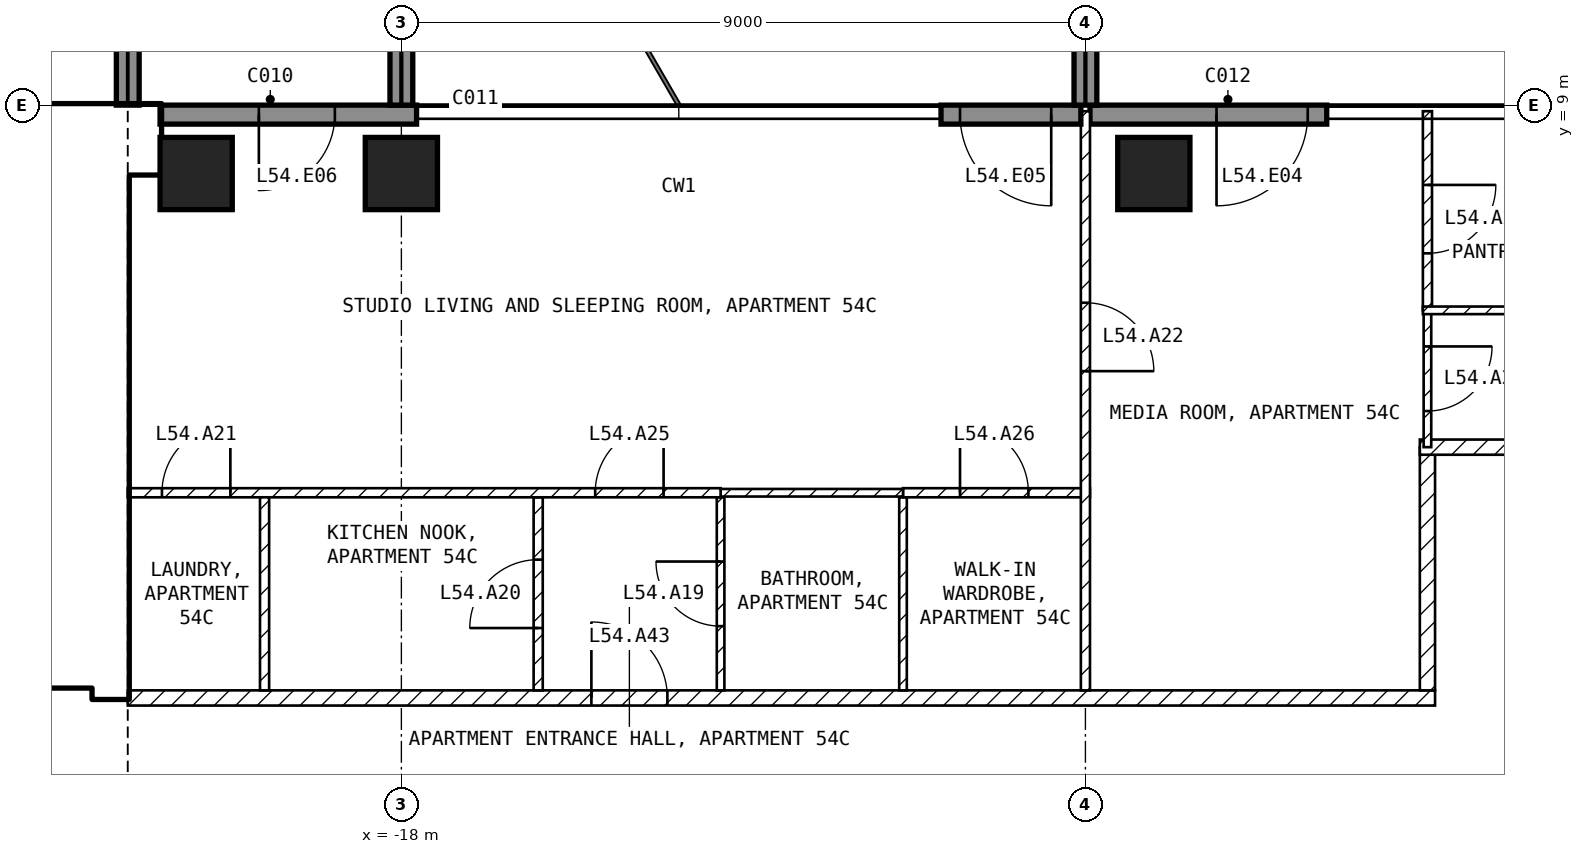
"""IFC4 building model, lengths in metres.
Left out: names, types, materials, properties, quantities, classifications, styles, units other than length and angle.
Written with IfcOpenShell. Run it as: python <this file> out.ifc"""

import sys

from ifc_helpers import new_model, si_unit, direction, frame, frame_2d, origin, origin_2d, place, context, subcontext, project, spatial, rectangle, extrude, element, fill, save


model = new_model("IFC4")
c1 = context("Model", 3, precision=1e-05, world=origin(), true_north=direction((0.0, 1.0)))
c2 = subcontext(c1, "Body", "Model", "MODEL_VIEW")
j1 = project(units=[si_unit("LENGTHUNIT", "METRE"), si_unit("PLANEANGLEUNIT", "RADIAN")], contexts=[c1])
p1 = place(None, origin())
s1 = spatial("IfcSite", under=j1, at=p1, CompositionType="ELEMENT")
p2 = place(p1, origin())
s2 = spatial("IfcBuilding", under=s1, at=p2, CompositionType="ELEMENT")
p3 = place(p2, frame((0.0, 0.0, 215.6)))
s3 = spatial("IfcBuildingStorey", under=s2, at=p3, CompositionType="ELEMENT", Elevation=215.6)
for number, where, z_axis, x_axis in (
    (1, (-20.7, 8.1, -0.25), (0.0, 0.0, 1.0), (1.0, 0.0, 0.0)),
    (2, (-18.0, 8.1, -0.25), (0.0, 0.0, 1.0), (1.0, 0.0, 0.0)),
    (3, (-8.1, 8.1, -0.25), (0.0, 0.0, 1.0), (1.0, 0.0, 0.0)),
):
    element("IfcColumn", number, at=place(p3, frame(where, z_axis=z_axis, x_axis=x_axis)), inside=s3, PredefinedType="COLUMN", context=c2, shape_type="SweptSolid", body=[
        extrude(rectangle(XDim=0.95, YDim=0.95, at=origin_2d()), origin(), (0.0, 0.0, 1.0), 3.5),
    ])
p4 = place(p3, frame((-5.825, 8.875, 0.0), z_axis=(0.0, 0.0, 1.0), x_axis=(-1.0, 0.0, 0.0)))
e4 = element("IfcWall", 4, at=p4, inside=s3, PredefinedType="SOLIDWALL", context=c2, shape_type="SweptSolid", body=[
    extrude(rectangle(XDim=3.115, YDim=0.25, at=frame_2d((1.558, 0.0))), origin(), (0.0, 0.0, 1.0), 3.25),
])
p5 = place(p4, frame((0.25, 0.0, 0.0)))
e5 = element("IfcOpeningElement", 5, at=p5, cuts=e4, PredefinedType="OPENING", context=c2, shape_type="SweptSolid", body=[
    extrude(rectangle(XDim=1.2, YDim=2.4, at=frame_2d((0.6, 1.2))), frame((0.0, 0.135, 0.0), z_axis=(0.0, -1.0, 0.0), x_axis=(1.0, 0.0, 0.0)), (0.0, 0.0, 1.0), 0.27),
])
p6 = place(p3, frame((-9.06, 8.875, 0.0), z_axis=(0.0, 0.0, 1.0), x_axis=(-1.0, 0.0, 0.0)))
e6 = element("IfcWall", 6, at=p6, inside=s3, PredefinedType="SOLIDWALL", context=c2, shape_type="SweptSolid", body=[
    extrude(rectangle(XDim=1.84, YDim=0.25, at=frame_2d((0.92, 0.0))), origin(), (0.0, 0.0, 1.0), 3.25),
])
p7 = place(p6, frame((0.39, 0.0, 0.0)))
e7 = element("IfcOpeningElement", 7, at=p7, cuts=e6, PredefinedType="OPENING", context=c2, shape_type="SweptSolid", body=[
    extrude(rectangle(XDim=1.2, YDim=2.4, at=frame_2d((0.6, 1.2))), frame((0.0, 0.135, 0.0), z_axis=(0.0, -1.0, 0.0), x_axis=(1.0, 0.0, 0.0)), (0.0, 0.0, 1.0), 0.27),
])
p8 = place(p3, frame((-17.8, 8.875, 0.0), z_axis=(0.0, 0.0, 1.0), x_axis=(-1.0, 0.0, 0.0)))
e8 = element("IfcWall", 8, at=p8, inside=s3, PredefinedType="SOLIDWALL", context=c2, shape_type="SweptSolid", body=[
    extrude(rectangle(XDim=3.375, YDim=0.25, at=frame_2d((1.688, 0.0))), origin(), (0.0, 0.0, 1.0), 3.25),
])
p9 = place(p8, frame((1.075, 0.0, 0.0)))
e9 = element("IfcOpeningElement", 9, at=p9, cuts=e8, PredefinedType="OPENING", context=c2, shape_type="SweptSolid", body=[
    extrude(rectangle(XDim=1.0, YDim=2.4, at=frame_2d((0.5, 1.2))), frame((0.0, 0.135, 0.0), z_axis=(0.0, -1.0, 0.0), x_axis=(1.0, 0.0, 0.0)), (0.0, 0.0, 1.0), 0.27),
])
for number, where, z_axis, x_axis in (
    (10, (-21.6, 9.0, 0.0), (0.0, 0.0, 1.0), (0.0, 1.0, 0.0)),
    (11, (-18.0, 9.0, 0.0), (0.0, 0.0, 1.0), (0.0, 1.0, 0.0)),
    (12, (-9.0, 9.0, 0.0), (0.0, 0.0, 1.0), (0.0, 1.0, 0.0)),
):
    element("IfcWall", number, at=place(p3, frame(where, z_axis=z_axis, x_axis=x_axis)), inside=s3, PredefinedType="SOLIDWALL", context=c2, shape_type="SweptSolid", body=[
        extrude(rectangle(XDim=2.7, YDim=0.3, at=frame_2d((1.35, 0.0))), origin(), (0.0, 0.0, 1.0), 3.25),
    ])
p10 = place(p3, frame((-29.6, 8.55, 0.0), z_axis=(0.0, 0.0, 1.0), x_axis=(1.0, 0.0, 0.0)))
e13 = element("IfcWall", 13, at=p10, inside=s3, PredefinedType="SHEAR", context=c2, shape_type="SweptSolid", body=[
    extrude(rectangle(XDim=8.425, YDim=0.9, at=frame_2d((4.212, 0.0))), origin(), (0.0, 0.0, 1.0), 3.25),
])
p11 = place(p3, frame((-21.825, 1.2, 0.0), z_axis=(0.0, 0.0, 1.0), x_axis=(0.0, 1.0, 0.0)))
e14 = element("IfcWall", 14, at=p11, inside=s3, PredefinedType="SHEAR", context=c2, shape_type="SweptSolid", body=[
    extrude(rectangle(XDim=6.9, YDim=0.45, at=frame_2d((3.45, 0.0))), origin(), (0.0, 0.0, 1.0), 3.25),
])
p12 = place(p3, frame((-33.2, 1.45, 0.0), z_axis=(0.0, 0.0, 1.0), x_axis=(1.0, 0.0, 0.0)))
e15 = element("IfcWall", 15, at=p12, inside=s3, PredefinedType="SOLIDWALL", context=c2, shape_type="SweptSolid", body=[
    extrude(rectangle(XDim=11.15, YDim=0.2, at=frame_2d((5.575, 0.0))), origin(), (0.0, 0.0, 1.0), 3.25),
])
p13 = place(p12, frame((9.4, 0.0, 0.0)))
e16 = element("IfcOpeningElement", 16, at=p13, cuts=e15, PredefinedType="OPENING", context=c2, shape_type="SweptSolid", body=[
    extrude(rectangle(XDim=1.0, YDim=2.1, at=frame_2d((0.5, 1.05))), frame((0.0, 0.11, 0.0), z_axis=(0.0, -1.0, 0.0), x_axis=(1.0, 0.0, 0.0)), (0.0, 0.0, 1.0), 0.22),
])
p14 = place(p12, frame((6.9, 0.0, 0.0)))
e17 = element("IfcOpeningElement", 17, at=p14, cuts=e15, PredefinedType="OPENING", context=c2, shape_type="SweptSolid", body=[
    extrude(rectangle(XDim=1.0, YDim=2.1, at=frame_2d((0.5, 1.05))), frame((0.0, 0.11, 0.0), z_axis=(0.0, -1.0, 0.0), x_axis=(1.0, 0.0, 0.0)), (0.0, 0.0, 1.0), 0.22),
])
p15 = place(p12, frame((1.1, 0.0, 0.0)))
e18 = element("IfcOpeningElement", 18, at=p15, cuts=e15, PredefinedType="OPENING", context=c2, shape_type="SweptSolid", body=[
    extrude(rectangle(XDim=0.9, YDim=2.1, at=frame_2d((0.45, 1.05))), frame((0.0, 0.11, 0.0), z_axis=(0.0, -1.0, 0.0), x_axis=(1.0, 0.0, 0.0)), (0.0, 0.0, 1.0), 0.22),
])
p16 = place(p3, frame((-28.35, 5.15, 0.0), z_axis=(0.0, 0.0, 1.0), x_axis=(1.0, 0.0, 0.0)))
e19 = element("IfcWall", 19, at=p16, inside=s3, PredefinedType="SOLIDWALL", context=c2, shape_type="SweptSolid", body=[
    extrude(rectangle(XDim=6.3, YDim=0.2, at=frame_2d((3.15, 0.0))), origin(), (0.0, 0.0, 1.0), 3.25),
])
p17 = place(p16, frame((5.1, 0.0, 0.0)))
e20 = element("IfcOpeningElement", 20, at=p17, cuts=e19, PredefinedType="OPENING", context=c2, shape_type="SweptSolid", body=[
    extrude(rectangle(XDim=1.0, YDim=2.1, at=frame_2d((0.5, 1.05))), frame((0.0, 0.11, 0.0), z_axis=(0.0, -1.0, 0.0), x_axis=(1.0, 0.0, 0.0)), (0.0, 0.0, 1.0), 0.22),
])
p18 = place(p3, frame((-21.6, 1.2, 0.0), z_axis=(0.0, 0.0, 1.0), x_axis=(1.0, 0.0, 0.0)))
e21 = element("IfcWall", 21, at=p18, inside=s3, PredefinedType="PARTITIONING", context=c2, shape_type="SweptSolid", body=[
    extrude(rectangle(XDim=17.2, YDim=0.2, at=frame_2d((8.6, 0.0))), origin(), (0.0, 0.0, 1.0), 3.25),
])
p19 = place(p18, frame((6.1, 0.0, 0.0)))
e22 = element("IfcOpeningElement", 22, at=p19, cuts=e21, PredefinedType="OPENING", context=c2, shape_type="SweptSolid", body=[
    extrude(rectangle(XDim=1.0, YDim=2.1, at=frame_2d((0.5, 1.05))), frame((0.0, 0.11, 0.0), z_axis=(0.0, -1.0, 0.0), x_axis=(1.0, 0.0, 0.0)), (0.0, 0.0, 1.0), 0.22),
])
p20 = place(p3, frame((-4.5, 1.3, 0.0), z_axis=(0.0, 0.0, 1.0), x_axis=(0.0, 1.0, 0.0)))
e23 = element("IfcWall", 23, at=p20, inside=s3, PredefinedType="PARTITIONING", context=c2, shape_type="SweptSolid", body=[
    extrude(rectangle(XDim=3.2, YDim=0.2, at=frame_2d((1.6, 0.0))), origin(), (0.0, 0.0, 1.0), 3.25),
])
p21 = place(p3, frame((-4.6, 4.5, 0.0), z_axis=(0.0, 0.0, 1.0), x_axis=(1.0, 0.0, 0.0)))
e24 = element("IfcWall", 24, at=p21, inside=s3, PredefinedType="PARTITIONING", context=c2, shape_type="SweptSolid", body=[
    extrude(rectangle(XDim=3.5, YDim=0.2, at=frame_2d((1.75, 0.0))), origin(), (0.0, 0.0, 1.0), 3.25),
])
p22 = place(p3, frame((-11.4, 1.3, 0.0), z_axis=(0.0, 0.0, 1.0), x_axis=(0.0, 1.0, 0.0)))
e25 = element("IfcWall", 25, at=p22, inside=s3, PredefinedType="PARTITIONING", context=c2, shape_type="SweptSolid", body=[
    extrude(rectangle(XDim=2.54, YDim=0.1, at=frame_2d((1.27, 0.0))), origin(), (0.0, 0.0, 1.0), 3.25),
])
p23 = place(p3, frame((-11.4, 3.9, 0.0), z_axis=(0.0, 0.0, 1.0), x_axis=(1.0, 0.0, 0.0)))
e26 = element("IfcWall", 26, at=p23, inside=s3, PredefinedType="PARTITIONING", context=c2, shape_type="SweptSolid", body=[
    extrude(rectangle(XDim=2.46, YDim=0.12, at=frame_2d((1.23, 0.0))), origin(), (0.0, 0.0, 1.0), 3.25),
])
p24 = place(p23, frame((0.75, 0.0, 0.0)))
e27 = element("IfcOpeningElement", 27, at=p24, cuts=e26, PredefinedType="OPENING", context=c2, shape_type="SweptSolid", body=[
    extrude(rectangle(XDim=0.9, YDim=2.1, at=frame_2d((0.45, 1.05))), frame((0.0, 0.07, 0.0), z_axis=(0.0, -1.0, 0.0), x_axis=(1.0, 0.0, 0.0)), (0.0, 0.0, 1.0), 0.14),
])
p25 = place(p3, frame((-9.0, 8.92, 0.0), z_axis=(0.0, 0.0, 1.0), x_axis=(0.0, -1.0, 0.0)))
e28 = element("IfcWall", 28, at=p25, inside=s3, PredefinedType="PARTITIONING", context=c2, shape_type="SweptSolid", body=[
    extrude(rectangle(XDim=7.62, YDim=0.12, at=frame_2d((3.81, 0.0))), origin(), (0.0, 0.0, 1.0), 3.25),
])
p26 = place(p25, frame((2.52, 0.0, 0.0)))
e29 = element("IfcOpeningElement", 29, at=p26, cuts=e28, PredefinedType="OPENING", context=c2, shape_type="SweptSolid", body=[
    extrude(rectangle(XDim=0.9, YDim=2.1, at=frame_2d((0.45, 1.05))), frame((0.0, 0.07, 0.0), z_axis=(0.0, -1.0, 0.0), x_axis=(1.0, 0.0, 0.0)), (0.0, 0.0, 1.0), 0.14),
])
p27 = place(p3, frame((-13.8, 1.3, 0.0), z_axis=(0.0, 0.0, 1.0), x_axis=(0.0, 1.0, 0.0)))
e30 = element("IfcWall", 30, at=p27, inside=s3, PredefinedType="PARTITIONING", context=c2, shape_type="SweptSolid", body=[
    extrude(rectangle(XDim=2.54, YDim=0.1, at=frame_2d((1.27, 0.0))), origin(), (0.0, 0.0, 1.0), 3.25),
])
p28 = place(p27, frame((0.845, 0.0, 0.0)))
e31 = element("IfcOpeningElement", 31, at=p28, cuts=e30, PredefinedType="OPENING", context=c2, shape_type="SweptSolid", body=[
    extrude(rectangle(XDim=0.85, YDim=2.1, at=frame_2d((0.425, 1.05))), frame((0.0, 0.06, 0.0), z_axis=(0.0, -1.0, 0.0), x_axis=(1.0, 0.0, 0.0)), (0.0, 0.0, 1.0), 0.12),
])
p29 = place(p3, frame((-13.8, 3.9, 0.0), z_axis=(0.0, 0.0, 1.0), x_axis=(1.0, 0.0, 0.0)))
e32 = element("IfcWall", 32, at=p29, inside=s3, PredefinedType="PARTITIONING", context=c2, shape_type="SweptSolid", body=[
    extrude(rectangle(XDim=2.4, YDim=0.1, at=frame_2d((1.2, 0.0))), origin(), (0.0, 0.0, 1.0), 3.25),
])
p30 = place(p3, frame((-16.2, 1.3, 0.0), z_axis=(0.0, 0.0, 1.0), x_axis=(0.0, 1.0, 0.0)))
e33 = element("IfcWall", 33, at=p30, inside=s3, PredefinedType="PARTITIONING", context=c2, shape_type="SweptSolid", body=[
    extrude(rectangle(XDim=2.54, YDim=0.12, at=frame_2d((1.27, 0.0))), origin(), (0.0, 0.0, 1.0), 3.25),
])
p31 = place(p30, frame((0.82, 0.0, 0.0)))
e34 = element("IfcOpeningElement", 34, at=p31, cuts=e33, PredefinedType="OPENING", context=c2, shape_type="SweptSolid", body=[
    extrude(rectangle(XDim=0.9, YDim=2.1, at=frame_2d((0.45, 1.05))), frame((0.0, 0.07, 0.0), z_axis=(0.0, -1.0, 0.0), x_axis=(1.0, 0.0, 0.0)), (0.0, 0.0, 1.0), 0.14),
])
p32 = place(p3, frame((-21.6, 3.9, 0.0), z_axis=(0.0, 0.0, 1.0), x_axis=(1.0, 0.0, 0.0)))
e35 = element("IfcWall", 35, at=p32, inside=s3, PredefinedType="PARTITIONING", context=c2, shape_type="SweptSolid", body=[
    extrude(rectangle(XDim=7.8, YDim=0.12, at=frame_2d((3.9, 0.0))), origin(), (0.0, 0.0, 1.0), 3.25),
])
p33 = place(p32, frame((0.45, 0.0, 0.0)))
e36 = element("IfcOpeningElement", 36, at=p33, cuts=e35, PredefinedType="OPENING", context=c2, shape_type="SweptSolid", body=[
    extrude(rectangle(XDim=0.9, YDim=2.1, at=frame_2d((0.45, 1.05))), frame((0.0, 0.07, 0.0), z_axis=(0.0, -1.0, 0.0), x_axis=(1.0, 0.0, 0.0)), (0.0, 0.0, 1.0), 0.14),
])
p34 = place(p32, frame((6.15, 0.0, 0.0)))
e37 = element("IfcOpeningElement", 37, at=p34, cuts=e35, PredefinedType="OPENING", context=c2, shape_type="SweptSolid", body=[
    extrude(rectangle(XDim=0.9, YDim=2.1, at=frame_2d((0.45, 1.05))), frame((0.0, 0.07, 0.0), z_axis=(0.0, -1.0, 0.0), x_axis=(1.0, 0.0, 0.0)), (0.0, 0.0, 1.0), 0.14),
])
p35 = place(p3, frame((-19.8, 1.3, 0.0), z_axis=(0.0, 0.0, 1.0), x_axis=(0.0, 1.0, 0.0)))
e38 = element("IfcWall", 38, at=p35, inside=s3, PredefinedType="PARTITIONING", context=c2, shape_type="SweptSolid", body=[
    extrude(rectangle(XDim=2.54, YDim=0.12, at=frame_2d((1.27, 0.0))), origin(), (0.0, 0.0, 1.0), 3.25),
])
p36 = place(p3, frame((-4.5, 6.3, 0.0), z_axis=(0.0, 0.0, 1.0), x_axis=(0.0, -1.0, 0.0)))
e39 = element("IfcWall", 39, at=p36, inside=s3, PredefinedType="PARTITIONING", context=c2, shape_type="SweptSolid", body=[
    extrude(rectangle(XDim=1.8, YDim=0.1, at=frame_2d((0.9, 0.0))), origin(), (0.0, 0.0, 1.0), 3.25),
])
p37 = place(p36, frame((0.475, 0.0, 0.0)))
e40 = element("IfcOpeningElement", 40, at=p37, cuts=e39, PredefinedType="OPENING", context=c2, shape_type="SweptSolid", body=[
    extrude(rectangle(XDim=0.85, YDim=2.1, at=frame_2d((0.425, 1.05))), frame((0.0, 0.06, 0.0), z_axis=(0.0, -1.0, 0.0), x_axis=(1.0, 0.0, 0.0)), (0.0, 0.0, 1.0), 0.12),
])
p38 = place(p3, frame((-4.5, 8.92, 0.0), z_axis=(0.0, 0.0, 1.0), x_axis=(0.0, -1.0, 0.0)))
e41 = element("IfcWall", 41, at=p38, inside=s3, PredefinedType="PARTITIONING", context=c2, shape_type="SweptSolid", body=[
    extrude(rectangle(XDim=2.62, YDim=0.12, at=frame_2d((1.31, 0.0))), origin(), (0.0, 0.0, 1.0), 3.25),
])
p39 = place(p38, frame((0.97, 0.0, 0.0)))
e42 = element("IfcOpeningElement", 42, at=p39, cuts=e41, PredefinedType="OPENING", context=c2, shape_type="SweptSolid", body=[
    extrude(rectangle(XDim=0.9, YDim=2.1, at=frame_2d((0.45, 1.05))), frame((0.0, 0.07, 0.0), z_axis=(0.0, -1.0, 0.0), x_axis=(1.0, 0.0, 0.0)), (0.0, 0.0, 1.0), 0.14),
])
p40 = place(p3, frame((-4.56, 6.3, 0.0), z_axis=(0.0, 0.0, 1.0), x_axis=(1.0, 0.0, 0.0)))
e43 = element("IfcWall", 43, at=p40, inside=s3, PredefinedType="PARTITIONING", context=c2, shape_type="SweptSolid", body=[
    extrude(rectangle(XDim=3.46, YDim=0.1, at=frame_2d((1.73, 0.0))), origin(), (0.0, 0.0, 1.0), 3.25),
])
p41 = place(p5, origin())
e44 = element("IfcDoor", 44, at=p41, inside=s3, OperationType="SINGLE_SWING_RIGHT", PredefinedType="DOOR", context=c2, shape_type="SweptSolid", body=[
    extrude(rectangle(XDim=1.2, YDim=2.4, at=frame_2d((0.6, 1.2))), frame((0.0, 0.025, 0.0), z_axis=(0.0, -1.0, 0.0), x_axis=(1.0, 0.0, 0.0)), (0.0, 0.0, 1.0), 0.05),
])
fill(e5, e44)
p42 = place(p7, origin())
e45 = element("IfcDoor", 45, at=p42, inside=s3, OperationType="SINGLE_SWING_LEFT", PredefinedType="DOOR", context=c2, shape_type="SweptSolid", body=[
    extrude(rectangle(XDim=1.2, YDim=2.4, at=frame_2d((0.6, 1.2))), frame((0.0, 0.025, 0.0), z_axis=(0.0, -1.0, 0.0), x_axis=(1.0, 0.0, 0.0)), (0.0, 0.0, 1.0), 0.05),
])
fill(e7, e45)
p43 = place(p9, origin())
e46 = element("IfcDoor", 46, at=p43, inside=s3, OperationType="SINGLE_SWING_RIGHT", PredefinedType="DOOR", context=c2, shape_type="SweptSolid", body=[
    extrude(rectangle(XDim=1.0, YDim=2.4, at=frame_2d((0.5, 1.2))), frame((0.0, 0.025, 0.0), z_axis=(0.0, -1.0, 0.0), x_axis=(1.0, 0.0, 0.0)), (0.0, 0.0, 1.0), 0.05),
])
fill(e9, e46)
p44 = place(p17, origin())
e47 = element("IfcDoor", 47, at=p44, inside=s3, OperationType="SINGLE_SWING_LEFT", PredefinedType="DOOR", context=c2, shape_type="SweptSolid", body=[
    extrude(rectangle(XDim=1.0, YDim=2.1, at=frame_2d((0.5, 1.05))), frame((0.0, 0.025, 0.0), z_axis=(0.0, -1.0, 0.0), x_axis=(1.0, 0.0, 0.0)), (0.0, 0.0, 1.0), 0.05),
])
fill(e20, e47)
p45 = place(p28, origin())
e48 = element("IfcDoor", 48, at=p45, inside=s3, OperationType="SINGLE_SWING_RIGHT", PredefinedType="DOOR", context=c2, shape_type="SweptSolid", body=[
    extrude(rectangle(XDim=0.85, YDim=2.1, at=frame_2d((0.425, 1.05))), frame((0.0, 0.025, 0.0), z_axis=(0.0, -1.0, 0.0), x_axis=(1.0, 0.0, 0.0)), (0.0, 0.0, 1.0), 0.05),
])
fill(e31, e48)
p46 = place(p31, origin())
e49 = element("IfcDoor", 49, at=p46, inside=s3, OperationType="SINGLE_SWING_LEFT", PredefinedType="DOOR", context=c2, shape_type="SweptSolid", body=[
    extrude(rectangle(XDim=0.9, YDim=2.1, at=frame_2d((0.45, 1.05))), frame((0.0, 0.025, 0.0), z_axis=(0.0, -1.0, 0.0), x_axis=(1.0, 0.0, 0.0)), (0.0, 0.0, 1.0), 0.05),
])
fill(e34, e49)
p47 = place(p33, origin())
e50 = element("IfcDoor", 50, at=p47, inside=s3, OperationType="SINGLE_SWING_RIGHT", PredefinedType="DOOR", context=c2, shape_type="SweptSolid", body=[
    extrude(rectangle(XDim=0.9, YDim=2.1, at=frame_2d((0.45, 1.05))), frame((0.0, 0.025, 0.0), z_axis=(0.0, -1.0, 0.0), x_axis=(1.0, 0.0, 0.0)), (0.0, 0.0, 1.0), 0.05),
])
fill(e36, e50)
p48 = place(p26, origin())
e51 = element("IfcDoor", 51, at=p48, inside=s3, OperationType="SINGLE_SWING_RIGHT", PredefinedType="DOOR", context=c2, shape_type="SweptSolid", body=[
    extrude(rectangle(XDim=0.9, YDim=2.1, at=frame_2d((0.45, 1.05))), frame((0.0, 0.025, 0.0), z_axis=(0.0, -1.0, 0.0), x_axis=(1.0, 0.0, 0.0)), (0.0, 0.0, 1.0), 0.05),
])
fill(e29, e51)
p49 = place(p39, origin())
e52 = element("IfcDoor", 52, at=p49, inside=s3, OperationType="SINGLE_SWING_LEFT", PredefinedType="DOOR", context=c2, shape_type="SweptSolid", body=[
    extrude(rectangle(XDim=0.9, YDim=2.1, at=frame_2d((0.45, 1.05))), frame((0.0, 0.025, 0.0), z_axis=(0.0, -1.0, 0.0), x_axis=(1.0, 0.0, 0.0)), (0.0, 0.0, 1.0), 0.05),
])
fill(e42, e52)
p50 = place(p37, origin())
e53 = element("IfcDoor", 53, at=p50, inside=s3, OperationType="SINGLE_SWING_LEFT", PredefinedType="DOOR", context=c2, shape_type="SweptSolid", body=[
    extrude(rectangle(XDim=0.85, YDim=2.1, at=frame_2d((0.425, 1.05))), frame((0.0, 0.025, 0.0), z_axis=(0.0, -1.0, 0.0), x_axis=(1.0, 0.0, 0.0)), (0.0, 0.0, 1.0), 0.05),
])
fill(e40, e53)
p51 = place(p34, origin())
e54 = element("IfcDoor", 54, at=p51, inside=s3, OperationType="SINGLE_SWING_RIGHT", PredefinedType="DOOR", context=c2, shape_type="SweptSolid", body=[
    extrude(rectangle(XDim=0.9, YDim=2.1, at=frame_2d((0.45, 1.05))), frame((0.0, 0.025, 0.0), z_axis=(0.0, -1.0, 0.0), x_axis=(1.0, 0.0, 0.0)), (0.0, 0.0, 1.0), 0.05),
])
fill(e37, e54)
p52 = place(p24, origin())
e55 = element("IfcDoor", 55, at=p52, inside=s3, OperationType="SINGLE_SWING_LEFT", PredefinedType="DOOR", context=c2, shape_type="SweptSolid", body=[
    extrude(rectangle(XDim=0.9, YDim=2.1, at=frame_2d((0.45, 1.05))), frame((0.0, 0.025, 0.0), z_axis=(0.0, -1.0, 0.0), x_axis=(1.0, 0.0, 0.0)), (0.0, 0.0, 1.0), 0.05),
])
fill(e27, e55)
p53 = place(p19, origin())
e56 = element("IfcDoor", 56, at=p53, inside=s3, OperationType="SINGLE_SWING_LEFT", PredefinedType="DOOR", context=c2, shape_type="SweptSolid", body=[
    extrude(rectangle(XDim=1.0, YDim=2.1, at=frame_2d((0.5, 1.05))), frame((0.0, 0.025, 0.0), z_axis=(0.0, -1.0, 0.0), x_axis=(1.0, 0.0, 0.0)), (0.0, 0.0, 1.0), 0.05),
])
fill(e22, e56)
save(model, sys.argv[1])
